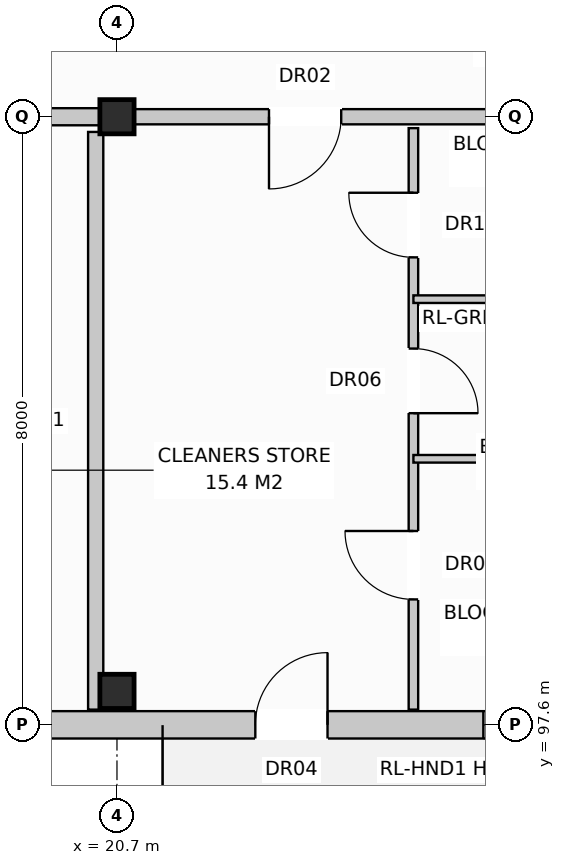
"""IFC4 building model, lengths in metres.
Left out: names, types, materials, properties, quantities, classifications, styles, units other than length and angle.
Written with IfcOpenShell. Run it as: python <this file> out.ifc"""

import sys

from ifc_helpers import new_model, si_unit, direction, frame, frame_2d, origin, origin_with_axes, origin_2d, place, context, subcontext, project, spatial, rectangle, extrude, element, fill, save


model = new_model("IFC4")
c1 = context("Model", 3, precision=1e-05, world=origin(), true_north=direction((0.0, 1.0)))
c2 = subcontext(c1, "Body", "Model", "MODEL_VIEW")
j1 = project(units=[si_unit("LENGTHUNIT", "METRE"), si_unit("PLANEANGLEUNIT", "RADIAN")], contexts=[c1])
p1 = place(None, origin())
s1 = spatial("IfcSite", under=j1, at=p1, CompositionType="ELEMENT")
p2 = place(p1, origin())
s2 = spatial("IfcBuilding", under=s1, at=p2, CompositionType="ELEMENT")
p3 = place(p2, frame((0.0, 0.0, 20.8)))
s3 = spatial("IfcBuildingStorey", under=s2, at=p3, CompositionType="ELEMENT", Elevation=20.8)
for number, where, z_axis, x_axis in (
    (1, (20.7, 98.04, 0.0), (0.0, 0.0, 1.0), (1.0, 0.0, 0.0)),
    (2, (20.7, 105.6, 0.0), (0.0, 0.0, 1.0), (1.0, 0.0, 0.0)),
):
    element("IfcColumn", number, at=place(p3, frame(where, z_axis=z_axis, x_axis=x_axis)), inside=s3, PredefinedType="COLUMN", context=c2, shape_type="SweptSolid", body=[
        extrude(rectangle(XDim=0.45, YDim=0.45, at=origin_2d()), origin(), (0.0, 0.0, 1.0), 3.2),
    ])
p4 = place(p3, frame((10.65, 97.6, 0.0), z_axis=(0.0, 0.0, 1.0), x_axis=(1.0, 0.0, 0.0)))
e3 = element("IfcWall", 3, at=p4, inside=s3, PredefinedType="STANDARD", context=c2, shape_type="SweptSolid", body=[
    extrude(rectangle(XDim=17.4, YDim=0.36, at=frame_2d((8.7, 0.0))), origin(), (0.0, 0.0, 1.0), 2.95),
])
p5 = place(p4, frame((11.87, 0.0, 0.0)))
e4 = element("IfcOpeningElement", 4, at=p5, cuts=e3, PredefinedType="OPENING", context=c2, shape_type="SweptSolid", body=[
    extrude(rectangle(XDim=0.95, YDim=2.1, at=frame_2d((0.475, 1.05))), frame((0.0, 0.192, 0.0), z_axis=(0.0, -1.0, 0.0), x_axis=(1.0, 0.0, 0.0)), (0.0, 0.0, 1.0), 0.384),
])
p6 = place(p4, frame((14.87, 0.0, 0.72)))
e5 = element("IfcOpeningElement", 5, at=p6, cuts=e3, PredefinedType="OPENING", context=c2, shape_type="SweptSolid", body=[
    extrude(rectangle(XDim=1.1, YDim=1.5, at=frame_2d((0.55, 0.75))), frame((0.0, 0.192, 0.0), z_axis=(0.0, -1.0, 0.0), x_axis=(1.0, 0.0, 0.0)), (0.0, 0.0, 1.0), 0.384),
])
p7 = place(p3, frame((20.42, 97.8, 0.0), z_axis=(0.0, 0.0, 1.0), x_axis=(0.0, 1.0, 0.0)))
e6 = element("IfcWall", 6, at=p7, inside=s3, PredefinedType="PARTITIONING", context=c2, shape_type="SweptSolid", body=[
    extrude(rectangle(XDim=7.6, YDim=0.2, at=frame_2d((3.8, 0.0))), origin(), (0.0, 0.0, 1.0), 2.95),
])
p8 = place(p3, frame((10.8, 105.6, 0.0), z_axis=(0.0, 0.0, 1.0), x_axis=(1.0, 0.0, 0.0)))
e7 = element("IfcWall", 7, at=p8, inside=s3, PredefinedType="PARTITIONING", context=c2, shape_type="SweptSolid", body=[
    extrude(rectangle(XDim=9.9, YDim=0.225, at=frame_2d((4.95, 0.0))), origin(), (0.0, 0.0, 1.0), 2.39),
])
p9 = place(p8, frame((0.475, 0.0, 0.0)))
e8 = element("IfcOpeningElement", 8, at=p9, cuts=e7, PredefinedType="OPENING", context=c2, shape_type="SweptSolid", body=[
    extrude(rectangle(XDim=1.1, YDim=2.15, at=frame_2d((0.55, 1.075))), frame((0.0, 0.125, 0.0), z_axis=(0.0, -1.0, 0.0), x_axis=(1.0, 0.0, 0.0)), (0.0, 0.0, 1.0), 0.249),
])
p10 = place(p8, frame((5.75, 0.0, 0.0)))
e9 = element("IfcOpeningElement", 9, at=p10, cuts=e7, PredefinedType="OPENING", context=c2, shape_type="SweptSolid", body=[
    extrude(rectangle(XDim=0.9, YDim=2.1, at=frame_2d((0.45, 1.05))), frame((0.0, 0.125, 0.0), z_axis=(0.0, -1.0, 0.0), x_axis=(1.0, 0.0, 0.0)), (0.0, 0.0, 1.0), 0.249),
])
p11 = place(p8, frame((7.8, 0.0, 0.0)))
e10 = element("IfcOpeningElement", 10, at=p11, cuts=e7, PredefinedType="OPENING", context=c2, shape_type="SweptSolid", body=[
    extrude(rectangle(XDim=0.95, YDim=2.15, at=frame_2d((0.475, 1.075))), frame((0.0, 0.125, 0.0), z_axis=(0.0, -1.0, 0.0), x_axis=(1.0, 0.0, 0.0)), (0.0, 0.0, 1.0), 0.249),
])
p12 = place(p3, frame((20.7, 105.6, 0.0), z_axis=(0.0, 0.0, 1.0), x_axis=(1.0, 0.0, 0.0)))
e11 = element("IfcWall", 11, at=p12, inside=s3, PredefinedType="PARTITIONING", context=c2, shape_type="SweptSolid", body=[
    extrude(rectangle(XDim=6.9, YDim=0.2, at=frame_2d((3.45, 0.0))), origin(), (0.0, 0.0, 1.0), 2.39),
])
p13 = place(p12, frame((2.0, 0.0, 0.0)))
e12 = element("IfcOpeningElement", 12, at=p13, cuts=e11, PredefinedType="OPENING", context=c2, shape_type="SweptSolid", body=[
    extrude(rectangle(XDim=0.95, YDim=2.15, at=frame_2d((0.475, 1.075))), frame((0.0, 0.112, 0.0), z_axis=(0.0, -1.0, 0.0), x_axis=(1.0, 0.0, 0.0)), (0.0, 0.0, 1.0), 0.224),
])
p14 = place(p3, frame((24.6, 105.45, 0.0), z_axis=(0.0, 0.0, 1.0), x_axis=(0.0, -1.0, 0.0)))
e13 = element("IfcWall", 13, at=p14, inside=s3, PredefinedType="PARTITIONING", context=c2, shape_type="SweptSolid", body=[
    extrude(rectangle(XDim=7.65, YDim=0.125, at=frame_2d((3.825, 0.0))), origin(), (0.0, 0.0, 1.0), 2.95),
])
p15 = place(p14, frame((0.85, 0.0, 0.0)))
e14 = element("IfcOpeningElement", 14, at=p15, cuts=e13, PredefinedType="OPENING", context=c2, shape_type="SweptSolid", body=[
    extrude(rectangle(XDim=0.85, YDim=2.1, at=frame_2d((0.425, 1.05))), frame((0.0, 0.074, 0.0), z_axis=(0.0, -1.0, 0.0), x_axis=(1.0, 0.0, 0.0)), (0.0, 0.0, 1.0), 0.149),
])
p16 = place(p14, frame((2.9, 0.0, 0.0)))
e15 = element("IfcOpeningElement", 15, at=p16, cuts=e13, PredefinedType="OPENING", context=c2, shape_type="SweptSolid", body=[
    extrude(rectangle(XDim=0.85, YDim=2.05, at=frame_2d((0.425, 1.025))), frame((0.0, 0.074, 0.0), z_axis=(0.0, -1.0, 0.0), x_axis=(1.0, 0.0, 0.0)), (0.0, 0.0, 1.0), 0.149),
])
p17 = place(p14, frame((5.3, 0.0, 0.0)))
e16 = element("IfcOpeningElement", 16, at=p17, cuts=e13, PredefinedType="OPENING", context=c2, shape_type="SweptSolid", body=[
    extrude(rectangle(XDim=0.9, YDim=2.1, at=frame_2d((0.45, 1.05))), frame((0.0, 0.074, 0.0), z_axis=(0.0, -1.0, 0.0), x_axis=(1.0, 0.0, 0.0)), (0.0, 0.0, 1.0), 0.149),
])
for number, where, z_axis, x_axis in (
    (17, (24.6, 103.2, 0.0), (0.0, 0.0, 1.0), (1.0, 0.0, 0.0)),
    (18, (24.6, 101.1, 0.0), (0.0, 0.0, 1.0), (1.0, 0.0, 0.0)),
):
    element("IfcWall", number, at=place(p3, frame(where, z_axis=z_axis, x_axis=x_axis)), inside=s3, PredefinedType="PARTITIONING", context=c2, shape_type="SweptSolid", body=[
        extrude(rectangle(XDim=2.9, YDim=0.1, at=frame_2d((1.45, 0.0))), origin(), (0.0, 0.0, 1.0), 2.95),
    ])
p18 = place(p5, origin_with_axes())
e19 = element("IfcDoor", 19, at=p18, inside=s3, OperationType="SINGLE_SWING_RIGHT", PredefinedType="DOOR", context=c2, shape_type="SweptSolid", body=[
    extrude(rectangle(XDim=0.95, YDim=2.1, at=frame_2d((0.475, 1.05))), frame((0.0, 0.025, 0.0), z_axis=(0.0, -1.0, 0.0), x_axis=(1.0, 0.0, 0.0)), (0.0, 0.0, 1.0), 0.05),
])
fill(e4, e19)
p19 = place(p6, origin_with_axes())
e20 = element("IfcWindow", 20, at=p19, inside=s3, PartitioningType="SINGLE_PANEL", PredefinedType="WINDOW", context=c2, shape_type="SweptSolid", body=[
    extrude(rectangle(XDim=1.1, YDim=1.5, at=frame_2d((0.55, 0.75))), frame((0.0, 0.03, 0.0), z_axis=(0.0, -1.0, 0.0), x_axis=(1.0, 0.0, 0.0)), (0.0, 0.0, 1.0), 0.06),
])
fill(e5, e20)
p20 = place(p13, frame((0.95, 0.0, 0.0), z_axis=(0.0, 0.0, 1.0), x_axis=(-1.0, 0.0, 0.0)))
e21 = element("IfcDoor", 21, at=p20, inside=s3, OperationType="SINGLE_SWING_LEFT", PredefinedType="DOOR", context=c2, shape_type="SweptSolid", body=[
    extrude(rectangle(XDim=0.95, YDim=2.15, at=frame_2d((0.475, 1.075))), frame((0.0, 0.025, 0.0), z_axis=(0.0, -1.0, 0.0), x_axis=(1.0, 0.0, 0.0)), (0.0, 0.0, 1.0), 0.05),
])
fill(e12, e21)
p21 = place(p15, frame((0.85, 0.0, 0.0), z_axis=(0.0, 0.0, 1.0), x_axis=(-1.0, 0.0, 0.0)))
e22 = element("IfcDoor", 22, at=p21, inside=s3, OperationType="SINGLE_SWING_LEFT", PredefinedType="DOOR", context=c2, shape_type="SweptSolid", body=[
    extrude(rectangle(XDim=0.85, YDim=2.1, at=frame_2d((0.425, 1.05))), frame((0.0, 0.025, 0.0), z_axis=(0.0, -1.0, 0.0), x_axis=(1.0, 0.0, 0.0)), (0.0, 0.0, 1.0), 0.05),
])
fill(e14, e22)
p22 = place(p16, origin_with_axes())
e23 = element("IfcDoor", 23, at=p22, inside=s3, OperationType="SINGLE_SWING_RIGHT", PredefinedType="DOOR", context=c2, shape_type="SweptSolid", body=[
    extrude(rectangle(XDim=0.85, YDim=2.05, at=frame_2d((0.425, 1.025))), frame((0.0, 0.025, 0.0), z_axis=(0.0, -1.0, 0.0), x_axis=(1.0, 0.0, 0.0)), (0.0, 0.0, 1.0), 0.05),
])
fill(e15, e23)
p23 = place(p17, frame((0.9, 0.0, 0.0), z_axis=(0.0, 0.0, 1.0), x_axis=(-1.0, 0.0, 0.0)))
e24 = element("IfcDoor", 24, at=p23, inside=s3, OperationType="SINGLE_SWING_LEFT", PredefinedType="DOOR", context=c2, shape_type="SweptSolid", body=[
    extrude(rectangle(XDim=0.9, YDim=2.1, at=frame_2d((0.45, 1.05))), frame((0.0, 0.025, 0.0), z_axis=(0.0, -1.0, 0.0), x_axis=(1.0, 0.0, 0.0)), (0.0, 0.0, 1.0), 0.05),
])
fill(e16, e24)
save(model, sys.argv[1])
